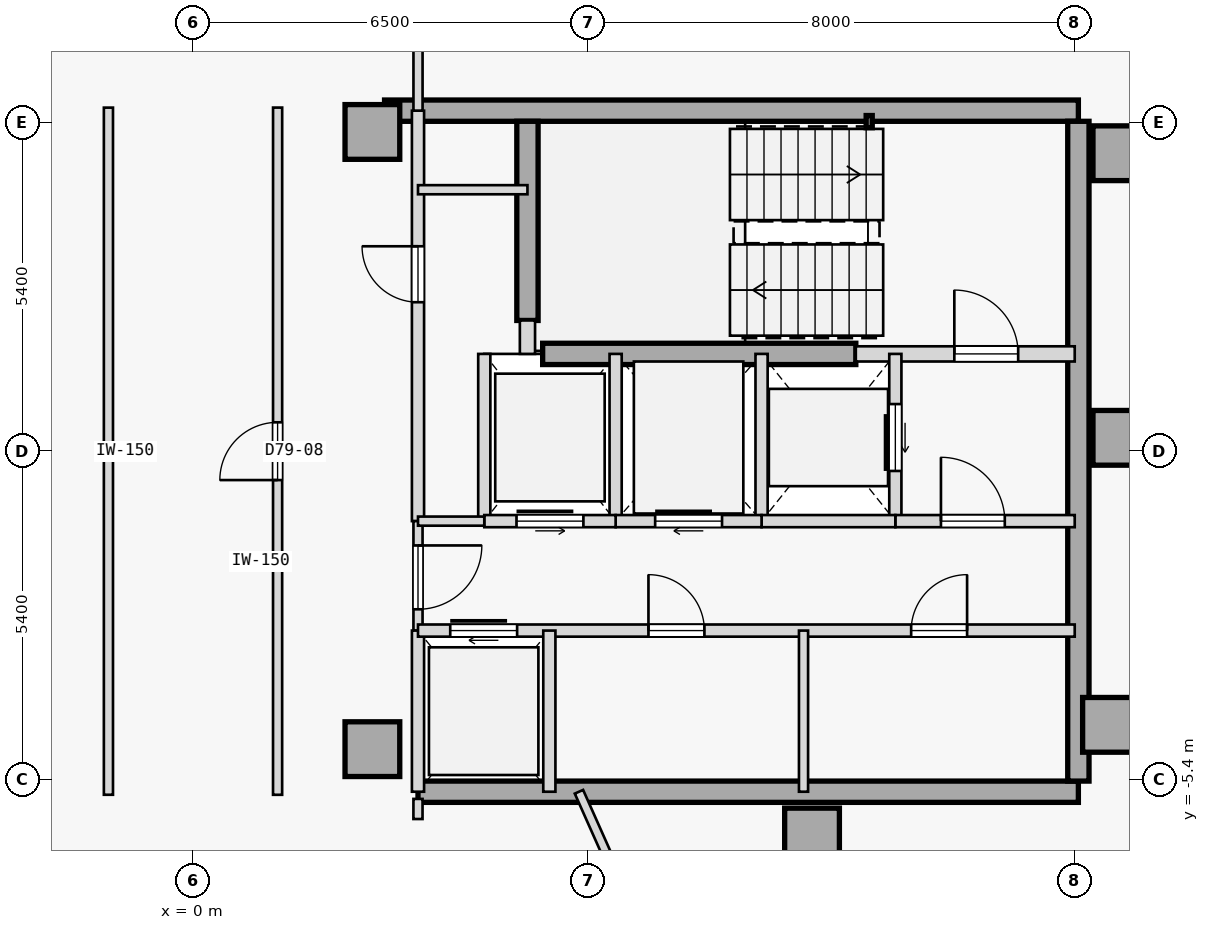
"""IFC4 building model, lengths in metres.
Left out: names, types, materials, properties, quantities, classifications, styles, units other than length and angle.
Written with IfcOpenShell. Run it as: python <this file> out.ifc"""

import sys

from ifc_helpers import new_model, si_unit, direction, frame, frame_2d, origin, origin_2d, place, context, subcontext, project, spatial, rectangle, hollow_rectangle, extrude, element, fill, save


model = new_model("IFC4")
c1 = context("Model", 3, precision=1e-05, world=origin(), true_north=direction((0.0, 1.0)))
c2 = subcontext(c1, "Body", "Model", "MODEL_VIEW")
j1 = project(units=[si_unit("LENGTHUNIT", "METRE"), si_unit("PLANEANGLEUNIT", "RADIAN")], contexts=[c1])
p1 = place(None, origin())
s1 = spatial("IfcSite", under=j1, at=p1, CompositionType="ELEMENT")
p2 = place(p1, origin())
s2 = spatial("IfcBuilding", under=s1, at=p2, CompositionType="ELEMENT")
p3 = place(p2, frame((0.0, 0.0, 295.3)))
s3 = spatial("IfcBuildingStorey", under=s2, at=p3, CompositionType="ELEMENT", Elevation=295.3)
for number, where, z_axis, x_axis in (
    (1, (15.25, 4.9, 0.0), (0.0, 0.0, 1.0), (1.0, 0.0, 0.0)),
    (2, (15.25, 0.22, 0.0), (0.0, 0.0, 1.0), (1.0, 0.0, 0.0)),
    (3, (15.08, -4.5, 0.0), (0.0, 0.0, 1.0), (1.0, 0.0, 0.0)),
    (4, (10.18, -6.32, 0.0), (0.0, 0.0, 1.0), (1.0, 0.0, 0.0)),
    (5, (2.95, -4.9, 0.0), (0.0, 0.0, 1.0), (1.0, 0.0, 0.0)),
    (6, (2.95, 5.25, 0.0), (0.0, 0.0, 1.0), (1.0, 0.0, 0.0)),
):
    element("IfcColumn", number, at=place(p3, frame(where, z_axis=z_axis, x_axis=x_axis)), inside=s3, PredefinedType="COLUMN", context=c2, shape_type="SweptSolid", body=[
        extrude(rectangle(XDim=0.9, YDim=0.9, at=origin_2d()), origin(), (0.0, 0.0, 1.0), 3.35),
    ])
p4 = place(p3, frame((3.15, 5.6, 0.0), z_axis=(0.0, 0.0, 1.0), x_axis=(1.0, 0.0, 0.0)))
e7 = element("IfcWall", 7, at=p4, inside=s3, PredefinedType="SHEAR", context=c2, shape_type="SweptSolid", body=[
    extrude(rectangle(XDim=11.41, YDim=0.35, at=frame_2d((5.705, 0.0))), origin(), (0.0, 0.0, 1.0), 3.125),
])
p5 = place(p3, frame((3.7, -5.6, 0.0), z_axis=(0.0, 0.0, 1.0), x_axis=(1.0, 0.0, 0.0)))
e8 = element("IfcWall", 8, at=p5, inside=s3, PredefinedType="SHEAR", context=c2, shape_type="SweptSolid", body=[
    extrude(rectangle(XDim=10.86, YDim=0.35, at=frame_2d((5.43, 0.0))), origin(), (0.0, 0.0, 1.0), 3.125),
])
p6 = place(p3, frame((14.56, -5.425, 0.0), z_axis=(0.0, 0.0, 1.0), x_axis=(0.0, 1.0, 0.0)))
e9 = element("IfcWall", 9, at=p6, inside=s3, PredefinedType="SHEAR", context=c2, shape_type="SweptSolid", body=[
    extrude(rectangle(XDim=10.85, YDim=0.35, at=frame_2d((5.425, 0.0))), origin(), (0.0, 0.0, 1.0), 3.125),
])
p7 = place(p3, frame((5.5, 2.15, 0.0), z_axis=(0.0, 0.0, 1.0), x_axis=(0.0, 1.0, 0.0)))
e10 = element("IfcWall", 10, at=p7, inside=s3, PredefinedType="SHEAR", context=c2, shape_type="SweptSolid", body=[
    extrude(rectangle(XDim=3.275, YDim=0.35, at=frame_2d((1.638, 0.0))), origin(), (0.0, 0.0, 1.0), 3.125),
])
p8 = place(p3, frame((5.75, 1.6, 0.0), z_axis=(0.0, 0.0, 1.0), x_axis=(1.0, 0.0, 0.0)))
e11 = element("IfcWall", 11, at=p8, inside=s3, PredefinedType="SHEAR", context=c2, shape_type="SweptSolid", body=[
    extrude(rectangle(XDim=5.15, YDim=0.35, at=frame_2d((2.575, 0.0))), origin(), (0.0, 0.0, 1.0), 3.125),
])
p9 = place(p3, frame((11.12, 5.42, 0.0), z_axis=(0.0, 0.0, 1.0), x_axis=(1.0, 0.0, 0.0)))
e12 = element("IfcColumn", 12, at=p9, inside=s3, PredefinedType="COLUMN", context=c2, shape_type="SweptSolid", body=[
    extrude(hollow_rectangle(XDim=0.1, YDim=0.2, WallThickness=0.008, at=origin_2d()), origin(), (0.0, 0.0, 1.0), 3.35),
])
p10 = place(p3, frame((10.9, 1.6, 0.0), z_axis=(0.0, 0.0, 1.0), x_axis=(1.0, 0.0, 0.0)))
e13 = element("IfcWall", 13, at=p10, inside=s3, PredefinedType="STANDARD", context=c2, shape_type="SweptSolid", body=[
    extrude(rectangle(XDim=3.6, YDim=0.25, at=frame_2d((1.8, 0.0))), origin(), (0.0, 0.0, 1.0), 3.125),
])
p11 = place(p10, frame((1.62, 0.0, 0.0)))
e14 = element("IfcOpeningElement", 14, at=p11, cuts=e13, PredefinedType="OPENING", context=c2, shape_type="SweptSolid", body=[
    extrude(rectangle(XDim=1.05, YDim=2.15, at=frame_2d((0.525, 1.075))), frame((0.0, 0.135, 0.0), z_axis=(0.0, -1.0, 0.0), x_axis=(1.0, 0.0, 0.0)), (0.0, 0.0, 1.0), 0.27),
])
p12 = place(p3, frame((5.5, 1.6, 0.0), z_axis=(0.0, 0.0, 1.0), x_axis=(0.0, 1.0, 0.0)))
e15 = element("IfcWall", 15, at=p12, inside=s3, PredefinedType="STANDARD", context=c2, shape_type="SweptSolid", body=[
    extrude(rectangle(XDim=0.55, YDim=0.25, at=frame_2d((0.275, 0.0))), origin(), (0.0, 0.0, 1.0), 3.125),
])
p13 = place(p3, frame((3.7, -1.15, 0.0), z_axis=(0.0, 0.0, 1.0), x_axis=(0.0, 1.0, 0.0)))
e16 = element("IfcWall", 16, at=p13, inside=s3, PredefinedType="STANDARD", context=c2, shape_type="SweptSolid", body=[
    extrude(rectangle(XDim=6.75, YDim=0.2, at=frame_2d((3.375, 0.0))), origin(), (0.0, 0.0, 1.0), 3.125),
])
p14 = place(p13, frame((3.6, 0.0, 0.0)))
e17 = element("IfcOpeningElement", 17, at=p14, cuts=e16, PredefinedType="OPENING", context=c2, shape_type="SweptSolid", body=[
    extrude(rectangle(XDim=0.92, YDim=2.15, at=frame_2d((0.46, 1.075))), frame((0.0, 0.11, 0.0), z_axis=(0.0, -1.0, 0.0), x_axis=(1.0, 0.0, 0.0)), (0.0, 0.0, 1.0), 0.22),
])
p15 = place(p3, frame((3.7, -2.95, 0.0), z_axis=(0.0, 0.0, 1.0), x_axis=(0.0, 1.0, 0.0)))
e18 = element("IfcWall", 18, at=p15, inside=s3, PredefinedType="PARTITIONING", context=c2, shape_type="SweptSolid", body=[
    extrude(rectangle(XDim=1.8, YDim=0.15, at=frame_2d((0.9, 0.0))), origin(), (0.0, 0.0, 1.0), 3.125),
])
p16 = place(p15, frame((0.35, 0.0, 0.0)))
e19 = element("IfcOpeningElement", 19, at=p16, cuts=e18, PredefinedType="OPENING", context=c2, shape_type="SweptSolid", body=[
    extrude(rectangle(XDim=1.05, YDim=2.18, at=frame_2d((0.525, 1.09))), frame((0.0, 0.085, 0.0), z_axis=(0.0, -1.0, 0.0), x_axis=(1.0, 0.0, 0.0)), (0.0, 0.0, 1.0), 0.17),
])
p17 = place(p3, frame((3.7, -5.6, 0.0), z_axis=(0.0, 0.0, 1.0), x_axis=(0.0, 1.0, 0.0)))
e20 = element("IfcWall", 20, at=p17, inside=s3, PredefinedType="STANDARD", context=c2, shape_type="SweptSolid", body=[
    extrude(rectangle(XDim=2.65, YDim=0.2, at=frame_2d((1.325, 0.0))), origin(), (0.0, 0.0, 1.0), 3.125),
])
p18 = place(p3, frame((11.55, -1.15, 0.0), z_axis=(0.0, 0.0, 1.0), x_axis=(0.0, 1.0, 0.0)))
e21 = element("IfcWall", 21, at=p18, inside=s3, PredefinedType="STANDARD", context=c2, shape_type="SweptSolid", body=[
    extrude(rectangle(XDim=2.75, YDim=0.2, at=frame_2d((1.375, 0.0))), origin(), (0.0, 0.0, 1.0), 3.125),
])
p19 = place(p18, frame((0.825, 0.0, 0.0)))
e22 = element("IfcOpeningElement", 22, at=p19, cuts=e21, PredefinedType="OPENING", context=c2, shape_type="SweptSolid", body=[
    extrude(rectangle(XDim=1.1, YDim=2.15, at=frame_2d((0.55, 1.075))), frame((0.0, 0.11, 0.0), z_axis=(0.0, -1.0, 0.0), x_axis=(1.0, 0.0, 0.0)), (0.0, 0.0, 1.0), 0.22),
])
p20 = place(p3, frame((9.35, -1.15, 0.0), z_axis=(0.0, 0.0, 1.0), x_axis=(0.0, 1.0, 0.0)))
e23 = element("IfcWall", 23, at=p20, inside=s3, PredefinedType="STANDARD", context=c2, shape_type="SweptSolid", body=[
    extrude(rectangle(XDim=2.75, YDim=0.2, at=frame_2d((1.375, 0.0))), origin(), (0.0, 0.0, 1.0), 3.125),
])
p21 = place(p3, frame((11.55, -1.15, 0.0), z_axis=(0.0, 0.0, 1.0), x_axis=(1.0, 0.0, 0.0)))
e24 = element("IfcWall", 24, at=p21, inside=s3, PredefinedType="STANDARD", context=c2, shape_type="SweptSolid", body=[
    extrude(rectangle(XDim=2.95, YDim=0.2, at=frame_2d((1.475, 0.0))), origin(), (0.0, 0.0, 1.0), 3.125),
])
p22 = place(p21, frame((0.75, 0.0, 0.0)))
e25 = element("IfcOpeningElement", 25, at=p22, cuts=e24, PredefinedType="OPENING", context=c2, shape_type="SweptSolid", body=[
    extrude(rectangle(XDim=1.05, YDim=2.18, at=frame_2d((0.525, 1.09))), frame((0.0, 0.11, 0.0), z_axis=(0.0, -1.0, 0.0), x_axis=(1.0, 0.0, 0.0)), (0.0, 0.0, 1.0), 0.22),
])
p23 = place(p3, frame((9.35, -1.15, 0.0), z_axis=(0.0, 0.0, 1.0), x_axis=(1.0, 0.0, 0.0)))
e26 = element("IfcWall", 26, at=p23, inside=s3, PredefinedType="STANDARD", context=c2, shape_type="SweptSolid", body=[
    extrude(rectangle(XDim=2.2, YDim=0.2, at=frame_2d((1.1, 0.0))), origin(), (0.0, 0.0, 1.0), 3.125),
])
p24 = place(p3, frame((6.95, -1.15, 0.0), z_axis=(0.0, 0.0, 1.0), x_axis=(0.0, 1.0, 0.0)))
e27 = element("IfcWall", 27, at=p24, inside=s3, PredefinedType="STANDARD", context=c2, shape_type="SweptSolid", body=[
    extrude(rectangle(XDim=2.75, YDim=0.2, at=frame_2d((1.375, 0.0))), origin(), (0.0, 0.0, 1.0), 3.125),
])
p25 = place(p3, frame((6.95, -1.15, 0.0), z_axis=(0.0, 0.0, 1.0), x_axis=(1.0, 0.0, 0.0)))
e28 = element("IfcWall", 28, at=p25, inside=s3, PredefinedType="STANDARD", context=c2, shape_type="SweptSolid", body=[
    extrude(rectangle(XDim=2.4, YDim=0.2, at=frame_2d((1.2, 0.0))), origin(), (0.0, 0.0, 1.0), 3.125),
])
p26 = place(p25, frame((0.65, 0.0, 0.0)))
e29 = element("IfcOpeningElement", 29, at=p26, cuts=e28, PredefinedType="OPENING", context=c2, shape_type="SweptSolid", body=[
    extrude(rectangle(XDim=1.1, YDim=2.15, at=frame_2d((0.55, 1.075))), frame((0.0, 0.11, 0.0), z_axis=(0.0, -1.0, 0.0), x_axis=(1.0, 0.0, 0.0)), (0.0, 0.0, 1.0), 0.22),
])
p27 = place(p3, frame((4.79, -1.15, 0.0), z_axis=(0.0, 0.0, 1.0), x_axis=(0.0, 1.0, 0.0)))
e30 = element("IfcWall", 30, at=p27, inside=s3, PredefinedType="STANDARD", context=c2, shape_type="SweptSolid", body=[
    extrude(rectangle(XDim=2.75, YDim=0.2, at=frame_2d((1.375, 0.0))), origin(), (0.0, 0.0, 1.0), 3.125),
])
p28 = place(p3, frame((4.79, -1.15, 0.0), z_axis=(0.0, 0.0, 1.0), x_axis=(1.0, 0.0, 0.0)))
e31 = element("IfcWall", 31, at=p28, inside=s3, PredefinedType="STANDARD", context=c2, shape_type="SweptSolid", body=[
    extrude(rectangle(XDim=2.16, YDim=0.2, at=frame_2d((1.08, 0.0))), origin(), (0.0, 0.0, 1.0), 3.125),
])
p29 = place(p28, frame((0.53, 0.0, 0.0)))
e32 = element("IfcOpeningElement", 32, at=p29, cuts=e31, PredefinedType="OPENING", context=c2, shape_type="SweptSolid", body=[
    extrude(rectangle(XDim=1.1, YDim=2.15, at=frame_2d((0.55, 1.075))), frame((0.0, 0.11, 0.0), z_axis=(0.0, -1.0, 0.0), x_axis=(1.0, 0.0, 0.0)), (0.0, 0.0, 1.0), 0.22),
])
p30 = place(p3, frame((3.7, -1.15, 0.0), z_axis=(0.0, 0.0, 1.0), x_axis=(1.0, 0.0, 0.0)))
e33 = element("IfcWall", 33, at=p30, inside=s3, PredefinedType="PARTITIONING", context=c2, shape_type="SweptSolid", body=[
    extrude(rectangle(XDim=1.09, YDim=0.15, at=frame_2d((0.545, 0.0))), origin(), (0.0, 0.0, 1.0), 3.125),
])
p31 = place(p3, frame((3.7, -2.95, 0.0), z_axis=(0.0, 0.0, 1.0), x_axis=(1.0, 0.0, 0.0)))
e34 = element("IfcWall", 34, at=p31, inside=s3, PredefinedType="STANDARD", context=c2, shape_type="SweptSolid", body=[
    extrude(rectangle(XDim=10.8, YDim=0.2, at=frame_2d((5.4, 0.0))), origin(), (0.0, 0.0, 1.0), 3.125),
])
p32 = place(p31, frame((0.53, 0.0, 0.0)))
e35 = element("IfcOpeningElement", 35, at=p32, cuts=e34, PredefinedType="OPENING", context=c2, shape_type="SweptSolid", body=[
    extrude(rectangle(XDim=1.1, YDim=2.15, at=frame_2d((0.55, 1.075))), frame((0.0, 0.11, 0.0), z_axis=(0.0, -1.0, 0.0), x_axis=(1.0, 0.0, 0.0)), (0.0, 0.0, 1.0), 0.22),
])
p33 = place(p31, frame((3.79, 0.0, 0.0)))
e36 = element("IfcOpeningElement", 36, at=p33, cuts=e34, PredefinedType="OPENING", context=c2, shape_type="SweptSolid", body=[
    extrude(rectangle(XDim=0.92, YDim=2.15, at=frame_2d((0.46, 1.075))), frame((0.0, 0.11, 0.0), z_axis=(0.0, -1.0, 0.0), x_axis=(1.0, 0.0, 0.0)), (0.0, 0.0, 1.0), 0.22),
])
p34 = place(p31, frame((8.11, 0.0, 0.0)))
e37 = element("IfcOpeningElement", 37, at=p34, cuts=e34, PredefinedType="OPENING", context=c2, shape_type="SweptSolid", body=[
    extrude(rectangle(XDim=0.92, YDim=2.15, at=frame_2d((0.46, 1.075))), frame((0.0, 0.11, 0.0), z_axis=(0.0, -1.0, 0.0), x_axis=(1.0, 0.0, 0.0)), (0.0, 0.0, 1.0), 0.22),
])
p35 = place(p3, frame((5.86, -5.6, 0.0), z_axis=(0.0, 0.0, 1.0), x_axis=(0.0, 1.0, 0.0)))
e38 = element("IfcWall", 38, at=p35, inside=s3, PredefinedType="STANDARD", context=c2, shape_type="SweptSolid", body=[
    extrude(rectangle(XDim=2.65, YDim=0.2, at=frame_2d((1.325, 0.0))), origin(), (0.0, 0.0, 1.0), 3.125),
])
p36 = place(p3, frame((10.04, -5.6, 0.0), z_axis=(0.0, 0.0, 1.0), x_axis=(0.0, 1.0, 0.0)))
e39 = element("IfcWall", 39, at=p36, inside=s3, PredefinedType="PARTITIONING", context=c2, shape_type="SweptSolid", body=[
    extrude(rectangle(XDim=2.65, YDim=0.15, at=frame_2d((1.325, 0.0))), origin(), (0.0, 0.0, 1.0), 3.125),
])
p37 = place(p3, frame((3.7, 4.3, 0.0), z_axis=(0.0, 0.0, 1.0), x_axis=(1.0, 0.0, 0.0)))
e40 = element("IfcWall", 40, at=p37, inside=s3, PredefinedType="PARTITIONING", context=c2, shape_type="SweptSolid", body=[
    extrude(rectangle(XDim=1.8, YDim=0.15, at=frame_2d((0.9, 0.0))), origin(), (0.0, 0.0, 1.0), 3.125),
])
p38 = place(p3, frame((-1.391, -5.65, 0.0), z_axis=(0.0, 0.0, 1.0), x_axis=(-2.1605738e-05, 0.999999999767, 0.0)))
e41 = element("IfcWall", 41, at=p38, inside=s3, PredefinedType="PARTITIONING", context=c2, shape_type="SweptSolid", body=[
    extrude(rectangle(XDim=11.3, YDim=0.15, at=frame_2d((5.65, 0.0))), origin(), (0.0, 0.0, 1.0), 3.125),
])
p39 = place(p3, frame((1.391, -5.65, 0.0), z_axis=(0.0, 0.0, 1.0), x_axis=(4.3206809e-05, 0.999999999067, 0.0)))
e42 = element("IfcWall", 42, at=p39, inside=s3, PredefinedType="PARTITIONING", context=c2, shape_type="SweptSolid", body=[
    extrude(rectangle(XDim=11.301, YDim=0.15, at=frame_2d((5.65, 0.0))), origin(), (0.0, 0.0, 1.0), 3.125),
])
p40 = place(p39, frame((5.176, 0.0, 0.0)))
e43 = element("IfcOpeningElement", 43, at=p40, cuts=e42, PredefinedType="OPENING", context=c2, shape_type="SweptSolid", body=[
    extrude(rectangle(XDim=0.95, YDim=2.15, at=frame_2d((0.475, 1.075))), frame((0.0, 0.085, 0.0), z_axis=(0.0, -1.0, 0.0), x_axis=(1.0, 0.0, 0.0)), (0.0, 0.0, 1.0), 0.17),
])
p41 = place(p3, frame((3.699, -6.049, 0.0), z_axis=(0.0, 0.0, 1.0), x_axis=(0.001476013152, 0.999998910692, 0.0)))
e44 = element("IfcWall", 44, at=p41, inside=s3, PredefinedType="PARTITIONING", context=c2, shape_type="SweptSolid", body=[
    extrude(rectangle(XDim=0.331, YDim=0.15, at=frame_2d((0.166, 0.0))), origin(), (0.0, 0.0, 1.0), 3.125),
])
p42 = place(p3, frame((3.7, 5.601, 0.0), z_axis=(0.0, 0.0, 1.0), x_axis=(0.0, 1.0, 0.0)))
e45 = element("IfcWall", 45, at=p42, inside=s3, PredefinedType="PARTITIONING", context=c2, shape_type="SweptSolid", body=[
    extrude(rectangle(XDim=3.713, YDim=0.15, at=frame_2d((1.856, 0.0))), origin(), (0.0, 0.0, 1.0), 3.125),
])
p43 = place(p42, frame((1.396, 0.0, 0.0)))
e46 = element("IfcOpeningElement", 46, at=p43, cuts=e45, PredefinedType="OPENING", context=c2, shape_type="SweptSolid", body=[
    extrude(rectangle(XDim=0.92, YDim=2.15, at=frame_2d((0.46, 1.075))), frame((0.0, 0.085, 0.0), z_axis=(0.0, -1.0, 0.0), x_axis=(1.0, 0.0, 0.0)), (0.0, 0.0, 1.0), 0.17),
])
p44 = place(p3, frame((7.696, -8.63, 0.0), z_axis=(0.0, 0.0, 1.0), x_axis=(-0.406773661192, 0.913528975217, 0.0)))
e47 = element("IfcWall", 47, at=p44, inside=s3, PredefinedType="PARTITIONING", context=c2, shape_type="SweptSolid", body=[
    extrude(rectangle(XDim=3.316, YDim=0.15, at=frame_2d((1.658, 0.0))), origin(), (0.0, 0.0, 1.0), 3.125),
])
p45 = place(p11, origin())
e48 = element("IfcDoor", 48, at=p45, inside=s3, OperationType="SINGLE_SWING_LEFT", PredefinedType="DOOR", context=c2, shape_type="SweptSolid", body=[
    extrude(rectangle(XDim=1.05, YDim=2.15, at=frame_2d((0.525, 1.075))), frame((0.0, 0.025, 0.0), z_axis=(0.0, -1.0, 0.0), x_axis=(1.0, 0.0, 0.0)), (0.0, 0.0, 1.0), 0.05),
])
fill(e14, e48)
p46 = place(p22, origin())
e49 = element("IfcDoor", 49, at=p46, inside=s3, OperationType="SINGLE_SWING_LEFT", PredefinedType="DOOR", context=c2, shape_type="SweptSolid", body=[
    extrude(rectangle(XDim=1.05, YDim=2.18, at=frame_2d((0.525, 1.09))), frame((0.0, 0.025, 0.0), z_axis=(0.0, -1.0, 0.0), x_axis=(1.0, 0.0, 0.0)), (0.0, 0.0, 1.0), 0.05),
])
fill(e25, e49)
p47 = place(p16, frame((1.05, 0.0, 0.0), z_axis=(0.0, 0.0, 1.0), x_axis=(-1.0, 0.0, 0.0)))
e50 = element("IfcDoor", 50, at=p47, inside=s3, OperationType="SINGLE_SWING_RIGHT", PredefinedType="DOOR", context=c2, shape_type="SweptSolid", body=[
    extrude(rectangle(XDim=1.05, YDim=2.18, at=frame_2d((0.525, 1.09))), frame((0.0, 0.025, 0.0), z_axis=(0.0, -1.0, 0.0), x_axis=(1.0, 0.0, 0.0)), (0.0, 0.0, 1.0), 0.05),
])
fill(e19, e50)
p48 = place(p19, origin())
e51 = element("IfcDoor", 51, at=p48, inside=s3, OperationType="SLIDING_TO_RIGHT", PredefinedType="DOOR", context=c2, shape_type="SweptSolid", body=[
    extrude(rectangle(XDim=1.1, YDim=2.15, at=frame_2d((0.55, 1.075))), frame((0.0, 0.025, 0.0), z_axis=(0.0, -1.0, 0.0), x_axis=(1.0, 0.0, 0.0)), (0.0, 0.0, 1.0), 0.05),
])
fill(e22, e51)
p49 = place(p26, origin())
e52 = element("IfcDoor", 52, at=p49, inside=s3, OperationType="SLIDING_TO_RIGHT", PredefinedType="DOOR", context=c2, shape_type="SweptSolid", body=[
    extrude(rectangle(XDim=1.1, YDim=2.15, at=frame_2d((0.55, 1.075))), frame((0.0, 0.025, 0.0), z_axis=(0.0, -1.0, 0.0), x_axis=(1.0, 0.0, 0.0)), (0.0, 0.0, 1.0), 0.05),
])
fill(e29, e52)
p50 = place(p29, origin())
e53 = element("IfcDoor", 53, at=p50, inside=s3, OperationType="SLIDING_TO_LEFT", PredefinedType="DOOR", context=c2, shape_type="SweptSolid", body=[
    extrude(rectangle(XDim=1.1, YDim=2.15, at=frame_2d((0.55, 1.075))), frame((0.0, 0.025, 0.0), z_axis=(0.0, -1.0, 0.0), x_axis=(1.0, 0.0, 0.0)), (0.0, 0.0, 1.0), 0.05),
])
fill(e32, e53)
p51 = place(p32, origin())
e54 = element("IfcDoor", 54, at=p51, inside=s3, OperationType="SLIDING_TO_RIGHT", PredefinedType="DOOR", context=c2, shape_type="SweptSolid", body=[
    extrude(rectangle(XDim=1.1, YDim=2.15, at=frame_2d((0.55, 1.075))), frame((0.0, 0.025, 0.0), z_axis=(0.0, -1.0, 0.0), x_axis=(1.0, 0.0, 0.0)), (0.0, 0.0, 1.0), 0.05),
])
fill(e35, e54)
p52 = place(p33, origin())
e55 = element("IfcDoor", 55, at=p52, inside=s3, OperationType="SINGLE_SWING_LEFT", PredefinedType="DOOR", context=c2, shape_type="SweptSolid", body=[
    extrude(rectangle(XDim=0.92, YDim=2.15, at=frame_2d((0.46, 1.075))), frame((0.0, 0.025, 0.0), z_axis=(0.0, -1.0, 0.0), x_axis=(1.0, 0.0, 0.0)), (0.0, 0.0, 1.0), 0.05),
])
fill(e36, e55)
p53 = place(p34, origin())
e56 = element("IfcDoor", 56, at=p53, inside=s3, OperationType="SINGLE_SWING_RIGHT", PredefinedType="DOOR", context=c2, shape_type="SweptSolid", body=[
    extrude(rectangle(XDim=0.92, YDim=2.15, at=frame_2d((0.46, 1.075))), frame((0.0, 0.025, 0.0), z_axis=(0.0, -1.0, 0.0), x_axis=(1.0, 0.0, 0.0)), (0.0, 0.0, 1.0), 0.05),
])
fill(e37, e56)
p54 = place(p14, origin())
e57 = element("IfcDoor", 57, at=p54, inside=s3, OperationType="SINGLE_SWING_RIGHT", PredefinedType="DOOR", context=c2, shape_type="SweptSolid", body=[
    extrude(rectangle(XDim=0.92, YDim=2.15, at=frame_2d((0.46, 1.075))), frame((0.0, 0.025, 0.0), z_axis=(0.0, -1.0, 0.0), x_axis=(1.0, 0.0, 0.0)), (0.0, 0.0, 1.0), 0.05),
])
fill(e17, e57)
p55 = place(p40, origin())
e58 = element("IfcDoor", 58, at=p55, inside=s3, OperationType="SINGLE_SWING_LEFT", PredefinedType="DOOR", context=c2, shape_type="SweptSolid", body=[
    extrude(rectangle(XDim=0.95, YDim=2.15, at=frame_2d((0.475, 1.075))), frame((0.0, 0.025, 0.0), z_axis=(0.0, -1.0, 0.0), x_axis=(1.0, 0.0, 0.0)), (0.0, 0.0, 1.0), 0.05),
])
fill(e43, e58)
save(model, sys.argv[1])
